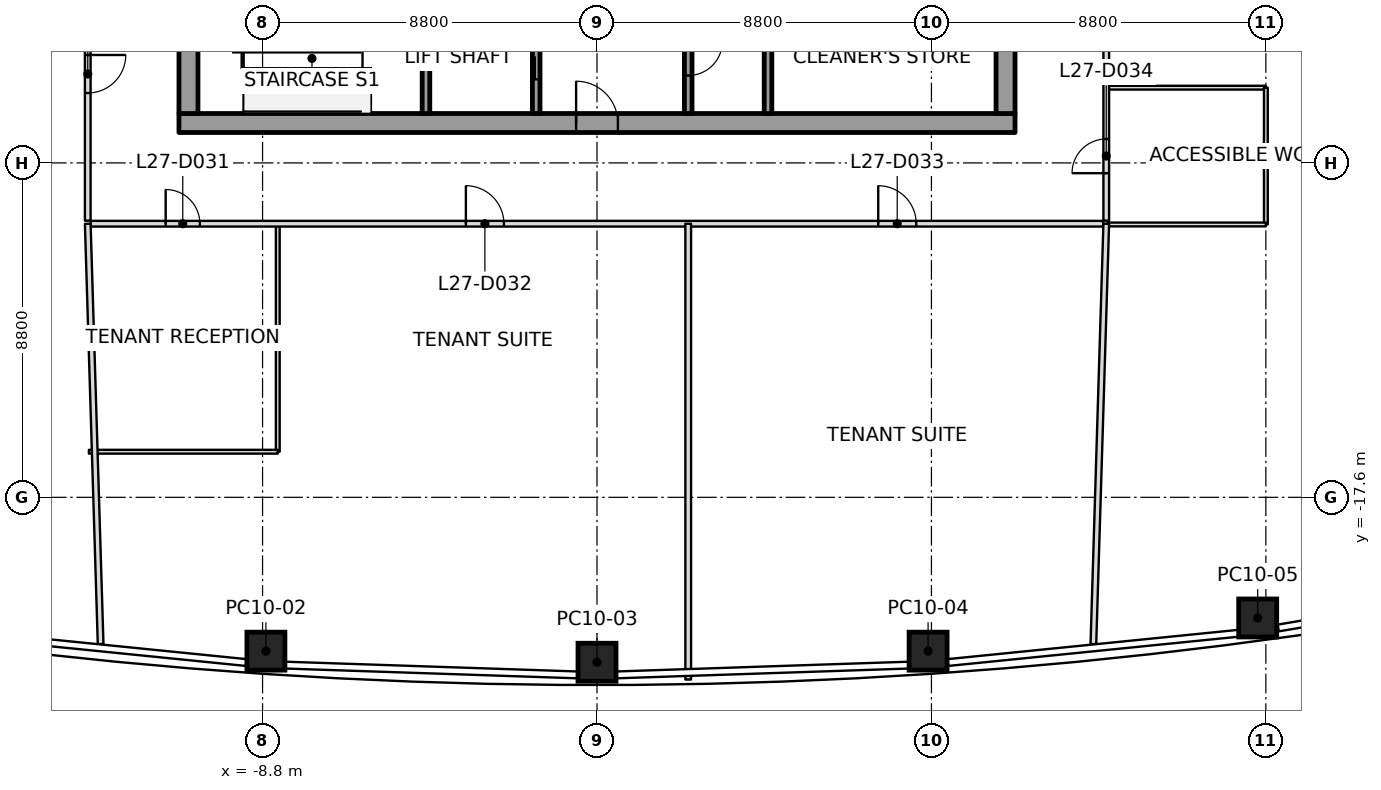
"""IFC4 building model, lengths in metres.
Left out: names, types, materials, properties, quantities, classifications, styles, units other than length and angle.
Written with IfcOpenShell. Run it as: python <this file> out.ifc"""

import sys

from ifc_helpers import new_model, si_unit, direction, frame, frame_2d, origin, origin_2d, place, context, subcontext, project, spatial, rectangle, extrude, element, fill, save


model = new_model("IFC4")
c1 = context("Model", 3, precision=1e-05, world=origin(), true_north=direction((0.0, 1.0)))
c2 = subcontext(c1, "Body", "Model", "MODEL_VIEW")
j1 = project(units=[si_unit("LENGTHUNIT", "METRE"), si_unit("PLANEANGLEUNIT", "RADIAN")], contexts=[c1])
p1 = place(None, origin())
s1 = spatial("IfcSite", under=j1, at=p1, CompositionType="ELEMENT")
p2 = place(p1, origin())
s2 = spatial("IfcBuilding", under=s1, at=p2, CompositionType="ELEMENT")
p3 = place(p2, frame((0.0, 0.0, 129.8)))
s3 = spatial("IfcBuildingStorey", under=s2, at=p3, CompositionType="ELEMENT", Elevation=129.8)
p4 = place(p3, frame((-8.712, -21.648, 0.0), z_axis=(0.008849199152, 0.01116829962, 0.999898475225), x_axis=(-0.997723247671, 0.066955214695, 0.008082096352)))
e1 = element("IfcColumn", 1, at=p4, inside=s3, PredefinedType="COLUMN", context=c2, shape_type="SweptSolid", body=[
    extrude(rectangle(XDim=1.0, YDim=1.0, at=origin_2d()), origin(), (0.0, 0.0, 1.0), 4.0),
])
p5 = place(p3, frame((0.0, -21.94, 0.0), z_axis=(0.0, 0.01141283087, 0.999934871525), x_axis=(1.0, 0.0, 0.0)))
e2 = element("IfcColumn", 2, at=p5, inside=s3, PredefinedType="COLUMN", context=c2, shape_type="SweptSolid", body=[
    extrude(rectangle(XDim=1.0, YDim=1.0, at=origin_2d()), origin(), (0.0, 0.0, 1.0), 4.0),
])
p6 = place(p3, frame((8.712, -21.648, 0.0), z_axis=(-0.008849199152, 0.01116829962, 0.999898475225), x_axis=(0.997723247671, 0.066955214695, 0.008082096352)))
e3 = element("IfcColumn", 3, at=p6, inside=s3, PredefinedType="COLUMN", context=c2, shape_type="SweptSolid", body=[
    extrude(rectangle(XDim=1.0, YDim=1.0, at=origin_2d()), origin(), (0.0, 0.0, 1.0), 4.0),
])
p7 = place(p3, frame((17.385, -20.775, 0.0), z_axis=(-0.017696459735, 0.010434809016, 0.999788952766), x_axis=(0.990903847039, 0.133599816886, 0.016144808774)))
e4 = element("IfcColumn", 4, at=p7, inside=s3, PredefinedType="COLUMN", context=c2, shape_type="SweptSolid", body=[
    extrude(rectangle(XDim=1.0, YDim=1.0, at=origin_2d()), origin(), (0.0, 0.0, 1.0), 4.001),
])
p8 = place(p3, frame((-11.0, -7.75, 0.0), z_axis=(0.0, 0.0, 1.0), x_axis=(1.0, 0.0, 0.0)))
e5 = element("IfcWall", 5, at=p8, inside=s3, PredefinedType="SHEAR", context=c2, shape_type="SweptSolid", body=[
    extrude(rectangle(XDim=22.0, YDim=0.5, at=frame_2d((11.0, 0.0))), origin(), (0.0, 0.0, 1.0), 4.0),
])
p9 = place(p8, frame((10.45, 0.0, 0.0)))
e6 = element("IfcOpeningElement", 6, at=p9, cuts=e5, PredefinedType="OPENING", context=c2, shape_type="SweptSolid", body=[
    extrude(rectangle(XDim=1.1, YDim=2.1, at=frame_2d((0.55, 1.05))), frame((0.0, 0.25, 0.0), z_axis=(0.0, -1.0, 0.0), x_axis=(1.0, 0.0, 0.0)), (0.0, 0.0, 1.0), 0.5),
])
p10 = place(p3, frame((-10.75, -7.5, 0.0), z_axis=(0.0, 0.0, 1.0), x_axis=(0.0, 1.0, 0.0)))
e7 = element("IfcWall", 7, at=p10, inside=s3, PredefinedType="SHEAR", context=c2, shape_type="SweptSolid", body=[
    extrude(rectangle(XDim=15.0, YDim=0.5, at=frame_2d((7.5, 0.0))), origin(), (0.0, 0.0, 1.0), 4.0),
])
p11 = place(p10, frame((6.6, 0.0, 0.0)))
e8 = element("IfcOpeningElement", 8, at=p11, cuts=e7, PredefinedType="OPENING", context=c2, shape_type="SweptSolid", body=[
    extrude(rectangle(XDim=1.8, YDim=2.1, at=frame_2d((0.9, 1.05))), frame((0.0, 0.25, 0.0), z_axis=(0.0, -1.0, 0.0), x_axis=(1.0, 0.0, 0.0)), (0.0, 0.0, 1.0), 0.5),
])
p12 = place(p3, frame((10.75, -7.5, 0.0), z_axis=(0.0, 0.0, 1.0), x_axis=(0.0, 1.0, 0.0)))
e9 = element("IfcWall", 9, at=p12, inside=s3, PredefinedType="SHEAR", context=c2, shape_type="SweptSolid", body=[
    extrude(rectangle(XDim=15.0, YDim=0.5, at=frame_2d((7.5, 0.0))), origin(), (0.0, 0.0, 1.0), 4.0),
])
p13 = place(p12, frame((6.6, 0.0, 0.0)))
e10 = element("IfcOpeningElement", 10, at=p13, cuts=e9, PredefinedType="OPENING", context=c2, shape_type="SweptSolid", body=[
    extrude(rectangle(XDim=1.8, YDim=2.1, at=frame_2d((0.9, 1.05))), frame((0.0, 0.25, 0.0), z_axis=(0.0, -1.0, 0.0), x_axis=(1.0, 0.0, 0.0)), (0.0, 0.0, 1.0), 0.5),
])
p14 = place(p3, frame((-4.5, -4.6, 0.0), z_axis=(0.0, 0.0, 1.0), x_axis=(0.0, -1.0, 0.0)))
e11 = element("IfcWall", 11, at=p14, inside=s3, PredefinedType="SOLIDWALL", context=c2, shape_type="SweptSolid", body=[
    extrude(rectangle(XDim=2.9, YDim=0.2, at=frame_2d((1.45, 0.0))), origin(), (0.0, 0.0, 1.0), 3.85),
])
p15 = place(p3, frame((-1.6, -7.5, 0.0), z_axis=(0.0, 0.0, 1.0), x_axis=(0.0, 1.0, 0.0)))
e12 = element("IfcWall", 12, at=p15, inside=s3, PredefinedType="SOLIDWALL", context=c2, shape_type="SweptSolid", body=[
    extrude(rectangle(XDim=2.9, YDim=0.2, at=frame_2d((1.45, 0.0))), origin(), (0.0, 0.0, 1.0), 3.85),
])
p16 = place(p15, frame((0.9, 0.0, 0.0)))
e13 = element("IfcOpeningElement", 13, at=p16, cuts=e12, PredefinedType="OPENING", context=c2, shape_type="SweptSolid", body=[
    extrude(rectangle(XDim=1.1, YDim=2.1, at=frame_2d((0.55, 1.05))), frame((0.0, 0.1, 0.0), z_axis=(0.0, -1.0, 0.0), x_axis=(1.0, 0.0, 0.0)), (0.0, 0.0, 1.0), 0.2),
])
p17 = place(p3, frame((2.4, -4.6, 0.0), z_axis=(0.0, 0.0, 1.0), x_axis=(0.0, -1.0, 0.0)))
e14 = element("IfcWall", 14, at=p17, inside=s3, PredefinedType="SOLIDWALL", context=c2, shape_type="SweptSolid", body=[
    extrude(rectangle(XDim=2.9, YDim=0.2, at=frame_2d((1.45, 0.0))), origin(), (0.0, 0.0, 1.0), 3.85),
])
p18 = place(p17, frame((1.0, 0.0, 0.0)))
e15 = element("IfcOpeningElement", 15, at=p18, cuts=e14, PredefinedType="OPENING", context=c2, shape_type="SweptSolid", body=[
    extrude(rectangle(XDim=0.9, YDim=2.1, at=frame_2d((0.45, 1.05))), frame((0.0, 0.1, 0.0), z_axis=(0.0, -1.0, 0.0), x_axis=(1.0, 0.0, 0.0)), (0.0, 0.0, 1.0), 0.2),
])
p19 = place(p3, frame((4.5, -4.6, 0.0), z_axis=(0.0, 0.0, 1.0), x_axis=(0.0, -1.0, 0.0)))
e16 = element("IfcWall", 16, at=p19, inside=s3, PredefinedType="SOLIDWALL", context=c2, shape_type="SweptSolid", body=[
    extrude(rectangle(XDim=2.9, YDim=0.2, at=frame_2d((1.45, 0.0))), origin(), (0.0, 0.0, 1.0), 3.85),
])
p20 = place(p3, frame((-13.4, -10.4, 0.0), z_axis=(0.0, 0.0, 1.0), x_axis=(0.030597011899, -0.999531801827, 0.0)))
e17 = element("IfcWall", 17, at=p20, inside=s3, PredefinedType="PARTITIONING", context=c2, shape_type="SweptSolid", body=[
    extrude(rectangle(XDim=11.067, YDim=0.15, at=frame_2d((5.534, 0.0))), origin(), (0.0, 0.0, 1.0), 3.234),
])
p21 = place(p3, frame((2.4, -10.4, 0.0), z_axis=(0.0, 0.0, 1.0), x_axis=(0.0, -1.0, 0.0)))
e18 = element("IfcWall", 18, at=p21, inside=s3, PredefinedType="PARTITIONING", context=c2, shape_type="SweptSolid", body=[
    extrude(rectangle(XDim=11.995, YDim=0.15, at=frame_2d((5.998, 0.0))), origin(), (0.0, 0.0, 1.0), 3.234),
])
p22 = place(p3, frame((13.4, -10.4, 0.0), z_axis=(0.0, 0.0, 1.0), x_axis=(-0.030597011899, -0.999531801827, 0.0)))
e19 = element("IfcWall", 19, at=p22, inside=s3, PredefinedType="PARTITIONING", context=c2, shape_type="SweptSolid", body=[
    extrude(rectangle(XDim=11.067, YDim=0.15, at=frame_2d((5.534, 0.0))), origin(), (0.0, 0.0, 1.0), 3.234),
])
p23 = place(p3, frame((-13.4, 10.32, 0.0), z_axis=(0.0, 0.0, 1.0), x_axis=(0.0, -1.0, 0.0)))
e20 = element("IfcWall", 20, at=p23, inside=s3, PredefinedType="PARTITIONING", context=c2, shape_type="SweptSolid", body=[
    extrude(rectangle(XDim=20.64, YDim=0.15, at=frame_2d((10.32, 0.0))), origin(), (0.0, 0.0, 1.0), 3.166),
])
p24 = place(p23, frame((4.32, 0.0, 0.0)))
e21 = element("IfcOpeningElement", 21, at=p24, cuts=e20, PredefinedType="OPENING", context=c2, shape_type="SweptSolid", body=[
    extrude(rectangle(XDim=1.0, YDim=2.1, at=frame_2d((0.5, 1.05))), frame((0.0, 0.075, 0.0), z_axis=(0.0, -1.0, 0.0), x_axis=(1.0, 0.0, 0.0)), (0.0, 0.0, 1.0), 0.15),
])
p25 = place(p23, frame((10.77, 0.0, 0.0)))
e22 = element("IfcOpeningElement", 22, at=p25, cuts=e20, PredefinedType="OPENING", context=c2, shape_type="SweptSolid", body=[
    extrude(rectangle(XDim=0.9, YDim=2.1, at=frame_2d((0.45, 1.05))), frame((0.0, 0.075, 0.0), z_axis=(0.0, -1.0, 0.0), x_axis=(1.0, 0.0, 0.0)), (0.0, 0.0, 1.0), 0.15),
])
p26 = place(p23, frame((16.28, 0.0, 0.0)))
e23 = element("IfcOpeningElement", 23, at=p26, cuts=e20, PredefinedType="OPENING", context=c2, shape_type="SweptSolid", body=[
    extrude(rectangle(XDim=1.0, YDim=2.1, at=frame_2d((0.5, 1.05))), frame((0.0, 0.075, 0.0), z_axis=(0.0, -1.0, 0.0), x_axis=(1.0, 0.0, 0.0)), (0.0, 0.0, 1.0), 0.15),
])
p27 = place(p3, frame((-13.32, -10.4, 0.0), z_axis=(0.0, 0.0, 1.0), x_axis=(1.0, 0.0, 0.0)))
e24 = element("IfcWall", 24, at=p27, inside=s3, PredefinedType="PARTITIONING", context=c2, shape_type="SweptSolid", body=[
    extrude(rectangle(XDim=26.64, YDim=0.15, at=frame_2d((13.32, 0.0))), origin(), (0.0, 0.0, 1.0), 3.317),
])
p28 = place(p27, frame((1.97, 0.0, 0.0)))
e25 = element("IfcOpeningElement", 25, at=p28, cuts=e24, PredefinedType="OPENING", context=c2, shape_type="SweptSolid", body=[
    extrude(rectangle(XDim=0.9, YDim=2.1, at=frame_2d((0.45, 1.05))), frame((0.0, 0.075, 0.0), z_axis=(0.0, -1.0, 0.0), x_axis=(1.0, 0.0, 0.0)), (0.0, 0.0, 1.0), 0.15),
])
p29 = place(p27, frame((9.87, 0.0, 0.0)))
e26 = element("IfcOpeningElement", 26, at=p29, cuts=e24, PredefinedType="OPENING", context=c2, shape_type="SweptSolid", body=[
    extrude(rectangle(XDim=1.0, YDim=2.1, at=frame_2d((0.5, 1.05))), frame((0.0, 0.075, 0.0), z_axis=(0.0, -1.0, 0.0), x_axis=(1.0, 0.0, 0.0)), (0.0, 0.0, 1.0), 0.15),
])
p30 = place(p27, frame((20.72, 0.0, 0.0)))
e27 = element("IfcOpeningElement", 27, at=p30, cuts=e24, PredefinedType="OPENING", context=c2, shape_type="SweptSolid", body=[
    extrude(rectangle(XDim=1.0, YDim=2.1, at=frame_2d((0.5, 1.05))), frame((0.0, 0.075, 0.0), z_axis=(0.0, -1.0, 0.0), x_axis=(1.0, 0.0, 0.0)), (0.0, 0.0, 1.0), 0.15),
])
p31 = place(p3, frame((13.4, -10.32, 0.0), z_axis=(0.0, 0.0, 1.0), x_axis=(0.0, 1.0, 0.0)))
e28 = element("IfcWall", 28, at=p31, inside=s3, PredefinedType="PARTITIONING", context=c2, shape_type="SweptSolid", body=[
    extrude(rectangle(XDim=20.64, YDim=0.15, at=frame_2d((10.32, 0.0))), origin(), (0.0, 0.0, 1.0), 3.166),
])
p32 = place(p31, frame((14.72, 0.0, 0.0)))
e29 = element("IfcOpeningElement", 29, at=p32, cuts=e28, PredefinedType="OPENING", context=c2, shape_type="SweptSolid", body=[
    extrude(rectangle(XDim=1.0, YDim=2.1, at=frame_2d((0.5, 1.05))), frame((0.0, 0.075, 0.0), z_axis=(0.0, -1.0, 0.0), x_axis=(1.0, 0.0, 0.0)), (0.0, 0.0, 1.0), 0.15),
])
p33 = place(p31, frame((1.25, 0.0, 0.0)))
e30 = element("IfcOpeningElement", 30, at=p33, cuts=e28, PredefinedType="OPENING", context=c2, shape_type="SweptSolid", body=[
    extrude(rectangle(XDim=0.9, YDim=2.1, at=frame_2d((0.45, 1.05))), frame((0.0, 0.075, 0.0), z_axis=(0.0, -1.0, 0.0), x_axis=(1.0, 0.0, 0.0)), (0.0, 0.0, 1.0), 0.15),
])
p34 = place(p31, frame((6.16, 0.0, 0.0)))
e31 = element("IfcOpeningElement", 31, at=p34, cuts=e28, PredefinedType="OPENING", context=c2, shape_type="SweptSolid", body=[
    extrude(rectangle(XDim=1.0, YDim=2.1, at=frame_2d((0.5, 1.05))), frame((0.0, 0.075, 0.0), z_axis=(0.0, -1.0, 0.0), x_axis=(1.0, 0.0, 0.0)), (0.0, 0.0, 1.0), 0.15),
])
p35 = place(p3, frame((-8.4, -10.43, 0.0), z_axis=(0.0, 0.0, 1.0), x_axis=(0.0, -1.0, 0.0)))
e32 = element("IfcWall", 32, at=p35, inside=s3, PredefinedType="PARTITIONING", context=c2, shape_type="SweptSolid", body=[
    extrude(rectangle(XDim=5.97, YDim=0.1, at=frame_2d((2.985, 0.0))), origin(), (0.0, 0.0, 1.0), 3.45),
])
p36 = place(p3, frame((-8.4, -16.4, 0.0), z_axis=(0.0, 0.0, 1.0), x_axis=(-1.0, 0.0, 0.0)))
e33 = element("IfcWall", 33, at=p36, inside=s3, PredefinedType="PARTITIONING", context=c2, shape_type="SweptSolid", body=[
    extrude(rectangle(XDim=4.97, YDim=0.1, at=frame_2d((2.485, 0.0))), origin(), (0.0, 0.0, 1.0), 3.317),
])
p37 = place(p3, frame((13.43, -6.82, 0.0), z_axis=(0.0, 0.0, 1.0), x_axis=(1.0, 0.0, 0.0)))
e34 = element("IfcWall", 34, at=p37, inside=s3, PredefinedType="PARTITIONING", context=c2, shape_type="SweptSolid", body=[
    extrude(rectangle(XDim=4.17, YDim=0.1, at=frame_2d((2.085, 0.0))), origin(), (0.0, 0.0, 1.0), 3.247),
])
p38 = place(p3, frame((17.6, -6.82, 0.0), z_axis=(0.0, 0.0, 1.0), x_axis=(0.0, -1.0, 0.0)))
e35 = element("IfcWall", 35, at=p38, inside=s3, PredefinedType="PARTITIONING", context=c2, shape_type="SweptSolid", body=[
    extrude(rectangle(XDim=3.6, YDim=0.1, at=frame_2d((1.8, 0.0))), origin(), (0.0, 0.0, 1.0), 3.45),
])
p39 = place(p3, frame((17.6, -10.42, 0.0), z_axis=(0.0, 0.0, 1.0), x_axis=(-1.0, 0.0, 0.0)))
e36 = element("IfcWall", 36, at=p39, inside=s3, PredefinedType="PARTITIONING", context=c2, shape_type="SweptSolid", body=[
    extrude(rectangle(XDim=4.17, YDim=0.1, at=frame_2d((2.085, 0.0))), origin(), (0.0, 0.0, 1.0), 3.166),
])
p40 = place(p26, origin())
e37 = element("IfcDoor", 37, at=p40, inside=s3, OperationType="SINGLE_SWING_RIGHT", PredefinedType="DOOR", context=c2, shape_type="SweptSolid", body=[
    extrude(rectangle(XDim=1.0, YDim=2.1, at=frame_2d((0.5, 1.05))), frame((0.0, 0.025, 0.0), z_axis=(0.0, -1.0, 0.0), x_axis=(1.0, 0.0, 0.0)), (0.0, 0.0, 1.0), 0.05),
])
fill(e23, e37)
p41 = place(p28, origin())
e38 = element("IfcDoor", 38, at=p41, inside=s3, OperationType="SINGLE_SWING_LEFT", PredefinedType="DOOR", context=c2, shape_type="SweptSolid", body=[
    extrude(rectangle(XDim=0.9, YDim=2.1, at=frame_2d((0.45, 1.05))), frame((0.0, 0.025, 0.0), z_axis=(0.0, -1.0, 0.0), x_axis=(1.0, 0.0, 0.0)), (0.0, 0.0, 1.0), 0.05),
])
fill(e25, e38)
p42 = place(p29, origin())
e39 = element("IfcDoor", 39, at=p42, inside=s3, OperationType="SINGLE_SWING_RIGHT", PredefinedType="DOOR", context=c2, shape_type="SweptSolid", body=[
    extrude(rectangle(XDim=1.0, YDim=2.1, at=frame_2d((0.5, 1.05))), frame((0.0, 0.025, 0.0), z_axis=(0.0, -1.0, 0.0), x_axis=(1.0, 0.0, 0.0)), (0.0, 0.0, 1.0), 0.05),
])
fill(e26, e39)
p43 = place(p30, origin())
e40 = element("IfcDoor", 40, at=p43, inside=s3, OperationType="SINGLE_SWING_RIGHT", PredefinedType="DOOR", context=c2, shape_type="SweptSolid", body=[
    extrude(rectangle(XDim=1.0, YDim=2.1, at=frame_2d((0.5, 1.05))), frame((0.0, 0.025, 0.0), z_axis=(0.0, -1.0, 0.0), x_axis=(1.0, 0.0, 0.0)), (0.0, 0.0, 1.0), 0.05),
])
fill(e27, e40)
p44 = place(p33, origin())
e41 = element("IfcDoor", 41, at=p44, inside=s3, OperationType="SINGLE_SWING_LEFT", PredefinedType="DOOR", context=c2, shape_type="SweptSolid", body=[
    extrude(rectangle(XDim=0.9, YDim=2.1, at=frame_2d((0.45, 1.05))), frame((0.0, 0.025, 0.0), z_axis=(0.0, -1.0, 0.0), x_axis=(1.0, 0.0, 0.0)), (0.0, 0.0, 1.0), 0.05),
])
fill(e30, e41)
p45 = place(p16, origin())
e42 = element("IfcDoor", 42, at=p45, inside=s3, OperationType="SLIDING_TO_RIGHT", PredefinedType="DOOR", context=c2, shape_type="SweptSolid", body=[
    extrude(rectangle(XDim=1.1, YDim=2.1, at=frame_2d((0.55, 1.05))), frame((0.0, 0.025, 0.0), z_axis=(0.0, -1.0, 0.0), x_axis=(1.0, 0.0, 0.0)), (0.0, 0.0, 1.0), 0.05),
])
fill(e13, e42)
p46 = place(p18, origin())
e43 = element("IfcDoor", 43, at=p46, inside=s3, OperationType="SINGLE_SWING_LEFT", PredefinedType="DOOR", context=c2, shape_type="SweptSolid", body=[
    extrude(rectangle(XDim=0.9, YDim=2.1, at=frame_2d((0.45, 1.05))), frame((0.0, 0.025, 0.0), z_axis=(0.0, -1.0, 0.0), x_axis=(1.0, 0.0, 0.0)), (0.0, 0.0, 1.0), 0.05),
])
fill(e15, e43)
p47 = place(p9, origin())
e44 = element("IfcDoor", 44, at=p47, inside=s3, OperationType="SINGLE_SWING_RIGHT", PredefinedType="DOOR", context=c2, shape_type="SweptSolid", body=[
    extrude(rectangle(XDim=1.1, YDim=2.1, at=frame_2d((0.55, 1.05))), frame((0.0, 0.025, 0.0), z_axis=(0.0, -1.0, 0.0), x_axis=(1.0, 0.0, 0.0)), (0.0, 0.0, 1.0), 0.05),
])
fill(e6, e44)
save(model, sys.argv[1])
